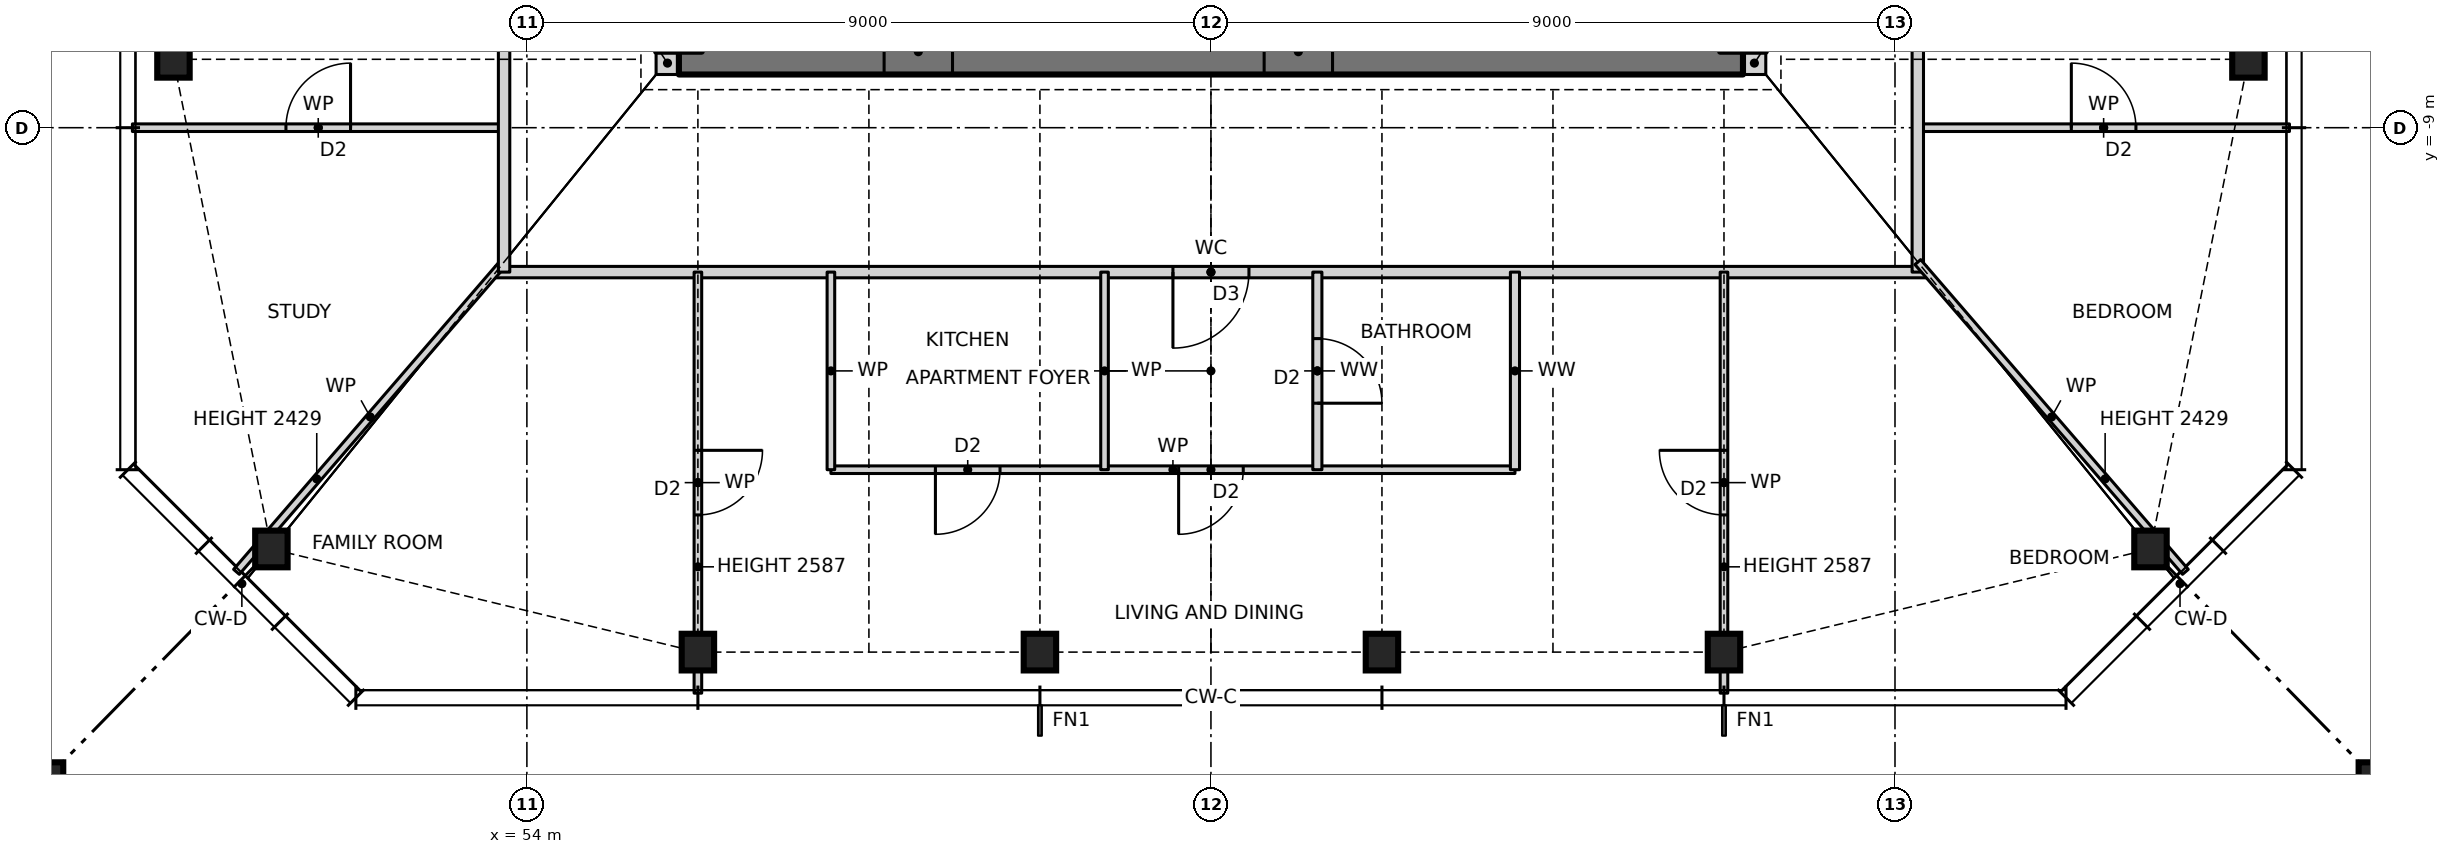
"""IFC4 building model, lengths in metres.
Left out: names, types, materials, properties, quantities, classifications, styles, units other than length and angle.
Written with IfcOpenShell. Run it as: python <this file> out.ifc"""

import sys

from ifc_helpers import new_model, si_unit, direction, frame, frame_2d, origin, origin_2d, place, context, subcontext, project, spatial, rectangle, hollow_rectangle, i_section, extrude, element, fill, save


model = new_model("IFC4")
c1 = context("Model", 3, precision=1e-05, world=origin(), true_north=direction((0.0, 1.0)))
c2 = subcontext(c1, "Body", "Model", "MODEL_VIEW")
j1 = project(units=[si_unit("LENGTHUNIT", "METRE"), si_unit("PLANEANGLEUNIT", "RADIAN")], contexts=[c1])
p1 = place(None, origin())
s1 = spatial("IfcSite", under=j1, at=p1, CompositionType="ELEMENT")
p2 = place(p1, origin())
s2 = spatial("IfcBuilding", under=s1, at=p2, CompositionType="ELEMENT")
p3 = place(p2, frame((0.0, 0.0, 119.0)))
s3 = spatial("IfcBuildingStorey", under=s2, at=p3, CompositionType="ELEMENT", Elevation=119.0)
for number, where, z_axis, x_axis in (
    (1, (50.639, -14.543, 0.0), (0.0, 0.0, 1.0), (1.0, 0.0, 0.0)),
    (2, (56.25, -15.9, 0.0), (0.0, 0.0, 1.0), (1.0, 0.0, 0.0)),
    (3, (60.75, -15.9, 0.0), (0.0, 0.0, 1.0), (1.0, 0.0, 0.0)),
    (4, (65.25, -15.9, 0.0), (0.0, 0.0, 1.0), (1.0, 0.0, 0.0)),
    (5, (69.75, -15.9, 0.0), (0.0, 0.0, 1.0), (1.0, 0.0, 0.0)),
    (6, (75.361, -14.543, 0.0), (0.0, 0.0, 1.0), (1.0, 0.0, 0.0)),
    (7, (76.65, -8.1, 0.0), (0.0, 0.0, 1.0), (1.0, 0.0, 0.0)),
    (8, (49.35, -8.1, 0.0), (0.0, 0.0, 1.0), (1.0, 0.0, 0.0)),
):
    element("IfcColumn", number, at=place(p3, frame(where, z_axis=z_axis, x_axis=x_axis)), inside=s3, PredefinedType="COLUMN", context=c2, shape_type="SweptSolid", body=[
        extrude(i_section(OverallWidth=0.427, OverallDepth=0.483, WebThickness=0.051, FlangeThickness=0.082, at=origin_2d()), origin(), (0.0, 0.0, 1.0), 3.5),
    ])
for number, where, z_axis, x_axis in (
    (9, (47.35, -17.9, 0.0), (0.0, 0.0, 1.0), (1.0, 0.0, 0.0)),
    (10, (78.65, -17.9, 0.0), (0.0, 0.0, 1.0), (1.0, 0.0, 0.0)),
):
    element("IfcColumn", number, at=place(p3, frame(where, z_axis=z_axis, x_axis=x_axis)), inside=s3, PredefinedType="COLUMN", context=c2, shape_type="SweptSolid", body=[
        extrude(hollow_rectangle(XDim=1.1, YDim=1.1, WallThickness=0.06, at=origin_2d()), origin(), (0.0, 0.0, 1.0), 3.5),
    ])
for number, where, z_axis, x_axis in (
    (11, (55.7, -8.15, 0.0), (0.0, 0.0, 1.0), (1.0, 0.0, 0.0)),
    (12, (70.0, -8.15, 0.0), (0.0, 0.0, 1.0), (1.0, 0.0, 0.0)),
):
    element("IfcWall", number, at=place(p3, frame(where, z_axis=z_axis, x_axis=x_axis)), inside=s3, PredefinedType="SOLIDWALL", context=c2, shape_type="SweptSolid", body=[
        extrude(rectangle(XDim=0.3, YDim=0.3, at=frame_2d((0.15, 0.0))), origin(), (0.0, 0.0, 1.0), 3.5),
    ])
p4 = place(p3, frame((56.0, -8.0, 0.0), z_axis=(0.0, 0.0, 1.0), x_axis=(1.0, 0.0, 0.0)))
e13 = element("IfcWall", 13, at=p4, inside=s3, PredefinedType="SHEAR", context=c2, shape_type="SweptSolid", body=[
    extrude(rectangle(XDim=14.0, YDim=0.6, at=frame_2d((7.0, 0.0))), origin(), (0.0, 0.0, 1.0), 3.5),
])
p5 = place(p4, frame((2.7, 0.0, 0.0)))
e14 = element("IfcOpeningElement", 14, at=p5, cuts=e13, PredefinedType="OPENING", context=c2, shape_type="SweptSolid", body=[
    extrude(rectangle(XDim=0.9, YDim=2.1, at=frame_2d((0.45, 1.05))), frame((0.0, 0.31, 0.0), z_axis=(0.0, -1.0, 0.0), x_axis=(1.0, 0.0, 0.0)), (0.0, 0.0, 1.0), 0.62),
])
p6 = place(p4, frame((7.7, 0.0, 0.0)))
e15 = element("IfcOpeningElement", 15, at=p6, cuts=e13, PredefinedType="OPENING", context=c2, shape_type="SweptSolid", body=[
    extrude(rectangle(XDim=0.9, YDim=2.1, at=frame_2d((0.45, 1.05))), frame((0.0, 0.31, 0.0), z_axis=(0.0, -1.0, 0.0), x_axis=(1.0, 0.0, 0.0)), (0.0, 0.0, 1.0), 0.62),
])
p7 = place(p3, frame((58.0, -13.5, 0.0), z_axis=(0.0, 0.0, 1.0), x_axis=(1.0, 0.0, 0.0)))
e16 = element("IfcWall", 16, at=p7, inside=s3, PredefinedType="PARTITIONING", context=c2, shape_type="SweptSolid", body=[
    extrude(rectangle(XDim=9.0, YDim=0.1, at=frame_2d((4.5, 0.0))), origin(), (0.0, 0.0, 1.0), 3.27),
])
p8 = place(p7, frame((1.375, 0.0, 0.0)))
e17 = element("IfcOpeningElement", 17, at=p8, cuts=e16, PredefinedType="OPENING", context=c2, shape_type="SweptSolid", body=[
    extrude(rectangle(XDim=0.85, YDim=2.1, at=frame_2d((0.425, 1.05))), frame((0.0, 0.06, 0.0), z_axis=(0.0, -1.0, 0.0), x_axis=(1.0, 0.0, 0.0)), (0.0, 0.0, 1.0), 0.12),
])
p9 = place(p7, frame((4.575, 0.0, 0.0)))
e18 = element("IfcOpeningElement", 18, at=p9, cuts=e16, PredefinedType="OPENING", context=c2, shape_type="SweptSolid", body=[
    extrude(rectangle(XDim=0.85, YDim=2.1, at=frame_2d((0.425, 1.05))), frame((0.0, 0.06, 0.0), z_axis=(0.0, -1.0, 0.0), x_axis=(1.0, 0.0, 0.0)), (0.0, 0.0, 1.0), 0.12),
])
p10 = place(p3, frame((53.586, -10.9, 0.0), z_axis=(0.0, 0.0, 1.0), x_axis=(1.0, 0.0, 0.0)))
e19 = element("IfcWall", 19, at=p10, inside=s3, PredefinedType="PARTITIONING", context=c2, shape_type="SweptSolid", body=[
    extrude(rectangle(XDim=18.828, YDim=0.15, at=frame_2d((9.414, 0.0))), origin(), (0.0, 0.0, 1.0), 3.27),
])
p11 = place(p10, frame((8.914, 0.0, 0.0)))
e20 = element("IfcOpeningElement", 20, at=p11, cuts=e19, PredefinedType="OPENING", context=c2, shape_type="SweptSolid", body=[
    extrude(rectangle(XDim=1.0, YDim=2.1, at=frame_2d((0.5, 1.05))), frame((0.0, 0.085, 0.0), z_axis=(0.0, -1.0, 0.0), x_axis=(1.0, 0.0, 0.0)), (0.0, 0.0, 1.0), 0.17),
])
p12 = place(p3, frame((48.81, -9.0, 0.0), z_axis=(0.0, 0.0, 1.0), x_axis=(1.0, 0.0, 0.0)))
e21 = element("IfcWall", 21, at=p12, inside=s3, PredefinedType="PARTITIONING", context=c2, shape_type="SweptSolid", body=[
    extrude(rectangle(XDim=4.89, YDim=0.1, at=frame_2d((2.445, 0.0))), origin(), (0.0, 0.0, 1.0), 3.27),
])
p13 = place(p12, frame((2.02, 0.0, 0.0)))
e22 = element("IfcOpeningElement", 22, at=p13, cuts=e21, PredefinedType="OPENING", context=c2, shape_type="SweptSolid", body=[
    extrude(rectangle(XDim=0.85, YDim=2.1, at=frame_2d((0.425, 1.05))), frame((0.0, 0.06, 0.0), z_axis=(0.0, -1.0, 0.0), x_axis=(1.0, 0.0, 0.0)), (0.0, 0.0, 1.0), 0.12),
])
p14 = place(p3, frame((72.3, -9.0, 0.0), z_axis=(0.0, 0.0, 1.0), x_axis=(1.0, 0.0, 0.0)))
e23 = element("IfcWall", 23, at=p14, inside=s3, PredefinedType="PARTITIONING", context=c2, shape_type="SweptSolid", body=[
    extrude(rectangle(XDim=4.89, YDim=0.1, at=frame_2d((2.445, 0.0))), origin(), (0.0, 0.0, 1.0), 3.27),
])
p15 = place(p14, frame((2.02, 0.0, 0.0)))
e24 = element("IfcOpeningElement", 24, at=p15, cuts=e23, PredefinedType="OPENING", context=c2, shape_type="SweptSolid", body=[
    extrude(rectangle(XDim=0.85, YDim=2.1, at=frame_2d((0.425, 1.05))), frame((0.0, 0.06, 0.0), z_axis=(0.0, -1.0, 0.0), x_axis=(1.0, 0.0, 0.0)), (0.0, 0.0, 1.0), 0.12),
])
p16 = place(p3, frame((50.179, -14.844, 0.0), z_axis=(0.0, 0.0, 1.0), x_axis=(0.653713095188, 0.756742485381, 0.0)))
e25 = element("IfcWall", 25, at=p16, inside=s3, PredefinedType="PARTITIONING", context=c2, shape_type="SweptSolid", body=[
    extrude(rectangle(XDim=5.386, YDim=0.1, at=frame_2d((2.693, 0.0))), origin(), (0.0, 0.0, 1.0), 2.429),
])
p17 = place(p3, frame((72.3, -10.9, 0.0), z_axis=(0.0, 0.0, 1.0), x_axis=(0.0, 1.0, 0.0)))
e26 = element("IfcWall", 26, at=p17, inside=s3, PredefinedType="PARTITIONING", context=c2, shape_type="SweptSolid", body=[
    extrude(rectangle(XDim=21.668, YDim=0.15, at=frame_2d((10.834, 0.0))), origin(), (0.0, 0.0, 1.0), 3.27),
])
p18 = place(p17, frame((10.4, 0.0, 0.0)))
e27 = element("IfcOpeningElement", 27, at=p18, cuts=e26, PredefinedType="OPENING", context=c2, shape_type="SweptSolid", body=[
    extrude(rectangle(XDim=1.0, YDim=2.1, at=frame_2d((0.5, 1.05))), frame((0.0, 0.085, 0.0), z_axis=(0.0, -1.0, 0.0), x_axis=(1.0, 0.0, 0.0)), (0.0, 0.0, 1.0), 0.17),
])
p19 = place(p3, frame((69.75, -16.44, 0.0), z_axis=(0.0, 0.0, 1.0), x_axis=(0.0, 1.0, 0.0)))
e28 = element("IfcWall", 28, at=p19, inside=s3, PredefinedType="PARTITIONING", context=c2, shape_type="SweptSolid", body=[
    extrude(rectangle(XDim=5.54, YDim=0.1, at=frame_2d((2.77, 0.0))), origin(), (0.0, 0.0, 1.0), 2.587),
])
p20 = place(p19, frame((2.345, 0.0, 0.0)))
e29 = element("IfcOpeningElement", 29, at=p20, cuts=e28, PredefinedType="OPENING", context=c2, shape_type="SweptSolid", body=[
    extrude(rectangle(XDim=0.85, YDim=2.1, at=frame_2d((0.425, 1.05))), frame((0.0, 0.06, 0.0), z_axis=(0.0, -1.0, 0.0), x_axis=(1.0, 0.0, 0.0)), (0.0, 0.0, 1.0), 0.12),
])
p21 = place(p3, frame((67.0, -13.5, 0.0), z_axis=(0.0, 0.0, 1.0), x_axis=(0.0, 1.0, 0.0)))
e30 = element("IfcWall", 30, at=p21, inside=s3, PredefinedType="PARTITIONING", context=c2, shape_type="SweptSolid", body=[
    extrude(rectangle(XDim=2.6, YDim=0.12, at=frame_2d((1.3, 0.0))), origin(), (0.0, 0.0, 1.0), 3.27),
])
p22 = place(p3, frame((64.4, -13.5, 0.0), z_axis=(0.0, 0.0, 1.0), x_axis=(0.0, 1.0, 0.0)))
e31 = element("IfcWall", 31, at=p22, inside=s3, PredefinedType="PARTITIONING", context=c2, shape_type="SweptSolid", body=[
    extrude(rectangle(XDim=2.6, YDim=0.12, at=frame_2d((1.3, 0.0))), origin(), (0.0, 0.0, 1.0), 3.27),
])
p23 = place(p22, frame((0.875, 0.0, 0.0)))
e32 = element("IfcOpeningElement", 32, at=p23, cuts=e31, PredefinedType="OPENING", context=c2, shape_type="SweptSolid", body=[
    extrude(rectangle(XDim=0.85, YDim=2.1, at=frame_2d((0.425, 1.05))), frame((0.0, 0.07, 0.0), z_axis=(0.0, -1.0, 0.0), x_axis=(1.0, 0.0, 0.0)), (0.0, 0.0, 1.0), 0.14),
])
for number, where, z_axis, x_axis in (
    (33, (61.6, -13.5, 0.0), (0.0, 0.0, 1.0), (0.0, 1.0, 0.0)),
    (34, (58.0, -13.5, 0.0), (0.0, 0.0, 1.0), (0.0, 1.0, 0.0)),
):
    element("IfcWall", number, at=place(p3, frame(where, z_axis=z_axis, x_axis=x_axis)), inside=s3, PredefinedType="PARTITIONING", context=c2, shape_type="SweptSolid", body=[
        extrude(rectangle(XDim=2.6, YDim=0.1, at=frame_2d((1.3, 0.0))), origin(), (0.0, 0.0, 1.0), 3.27),
    ])
p24 = place(p3, frame((56.25, -16.44, 0.0), z_axis=(0.0, 0.0, 1.0), x_axis=(0.0, 1.0, 0.0)))
e35 = element("IfcWall", 35, at=p24, inside=s3, PredefinedType="PARTITIONING", context=c2, shape_type="SweptSolid", body=[
    extrude(rectangle(XDim=5.54, YDim=0.1, at=frame_2d((2.77, 0.0))), origin(), (0.0, 0.0, 1.0), 2.587),
])
p25 = place(p24, frame((2.345, 0.0, 0.0)))
e36 = element("IfcOpeningElement", 36, at=p25, cuts=e35, PredefinedType="OPENING", context=c2, shape_type="SweptSolid", body=[
    extrude(rectangle(XDim=0.85, YDim=2.1, at=frame_2d((0.425, 1.05))), frame((0.0, 0.06, 0.0), z_axis=(0.0, -1.0, 0.0), x_axis=(1.0, 0.0, 0.0)), (0.0, 0.0, 1.0), 0.12),
])
p26 = place(p3, frame((53.7, -10.9, 0.0), z_axis=(0.0, 0.0, 1.0), x_axis=(0.0, 1.0, 0.0)))
e37 = element("IfcWall", 37, at=p26, inside=s3, PredefinedType="PARTITIONING", context=c2, shape_type="SweptSolid", body=[
    extrude(rectangle(XDim=21.668, YDim=0.15, at=frame_2d((10.834, 0.0))), origin(), (0.0, 0.0, 1.0), 3.27),
])
p27 = place(p26, frame((10.4, 0.0, 0.0)))
e38 = element("IfcOpeningElement", 38, at=p27, cuts=e37, PredefinedType="OPENING", context=c2, shape_type="SweptSolid", body=[
    extrude(rectangle(XDim=1.0, YDim=2.1, at=frame_2d((0.5, 1.05))), frame((0.0, 0.085, 0.0), z_axis=(0.0, -1.0, 0.0), x_axis=(1.0, 0.0, 0.0)), (0.0, 0.0, 1.0), 0.17),
])
p28 = place(p3, frame((75.821, -14.844, 0.0), z_axis=(0.0, 0.0, 1.0), x_axis=(-0.653713095188, 0.756742485381, 0.0)))
e39 = element("IfcWall", 39, at=p28, inside=s3, PredefinedType="PARTITIONING", context=c2, shape_type="SweptSolid", body=[
    extrude(rectangle(XDim=5.386, YDim=0.1, at=frame_2d((2.693, 0.0))), origin(), (0.0, 0.0, 1.0), 2.429),
])
p29 = place(p8, frame((0.85, 0.0, 0.0), z_axis=(0.0, 0.0, 1.0), x_axis=(-1.0, 0.0, 0.0)))
e40 = element("IfcDoor", 40, at=p29, inside=s3, OperationType="SINGLE_SWING_RIGHT", PredefinedType="DOOR", context=c2, shape_type="SweptSolid", body=[
    extrude(rectangle(XDim=0.85, YDim=2.1, at=frame_2d((0.425, 1.05))), frame((0.0, 0.025, 0.0), z_axis=(0.0, -1.0, 0.0), x_axis=(1.0, 0.0, 0.0)), (0.0, 0.0, 1.0), 0.05),
])
fill(e17, e40)
p30 = place(p11, frame((1.0, 0.0, 0.0), z_axis=(0.0, 0.0, 1.0), x_axis=(-1.0, 0.0, 0.0)))
e41 = element("IfcDoor", 41, at=p30, inside=s3, OperationType="SINGLE_SWING_RIGHT", PredefinedType="DOOR", context=c2, shape_type="SweptSolid", body=[
    extrude(rectangle(XDim=1.0, YDim=2.1, at=frame_2d((0.5, 1.05))), frame((0.0, 0.025, 0.0), z_axis=(0.0, -1.0, 0.0), x_axis=(1.0, 0.0, 0.0)), (0.0, 0.0, 1.0), 0.05),
])
fill(e20, e41)
p31 = place(p9, frame((0.85, 0.0, 0.0), z_axis=(0.0, 0.0, 1.0), x_axis=(-1.0, 0.0, 0.0)))
e42 = element("IfcDoor", 42, at=p31, inside=s3, OperationType="SINGLE_SWING_RIGHT", PredefinedType="DOOR", context=c2, shape_type="SweptSolid", body=[
    extrude(rectangle(XDim=0.85, YDim=2.1, at=frame_2d((0.425, 1.05))), frame((0.0, 0.025, 0.0), z_axis=(0.0, -1.0, 0.0), x_axis=(1.0, 0.0, 0.0)), (0.0, 0.0, 1.0), 0.05),
])
fill(e18, e42)
p32 = place(p23, frame((0.85, 0.0, 0.0), z_axis=(0.0, 0.0, 1.0), x_axis=(-1.0, 0.0, 0.0)))
e43 = element("IfcDoor", 43, at=p32, inside=s3, OperationType="SINGLE_SWING_RIGHT", PredefinedType="DOOR", context=c2, shape_type="SweptSolid", body=[
    extrude(rectangle(XDim=0.85, YDim=2.1, at=frame_2d((0.425, 1.05))), frame((0.0, 0.025, 0.0), z_axis=(0.0, -1.0, 0.0), x_axis=(1.0, 0.0, 0.0)), (0.0, 0.0, 1.0), 0.05),
])
fill(e32, e43)
p33 = place(p25, frame((0.85, 0.0, 0.0), z_axis=(0.0, 0.0, 1.0), x_axis=(-1.0, 0.0, 0.0)))
e44 = element("IfcDoor", 44, at=p33, inside=s3, OperationType="SINGLE_SWING_LEFT", PredefinedType="DOOR", context=c2, shape_type="SweptSolid", body=[
    extrude(rectangle(XDim=0.85, YDim=2.1, at=frame_2d((0.425, 1.05))), frame((0.0, 0.025, 0.0), z_axis=(0.0, -1.0, 0.0), x_axis=(1.0, 0.0, 0.0)), (0.0, 0.0, 1.0), 0.05),
])
fill(e36, e44)
p34 = place(p20, origin())
e45 = element("IfcDoor", 45, at=p34, inside=s3, OperationType="SINGLE_SWING_RIGHT", PredefinedType="DOOR", context=c2, shape_type="SweptSolid", body=[
    extrude(rectangle(XDim=0.85, YDim=2.1, at=frame_2d((0.425, 1.05))), frame((0.0, 0.025, 0.0), z_axis=(0.0, -1.0, 0.0), x_axis=(1.0, 0.0, 0.0)), (0.0, 0.0, 1.0), 0.05),
])
fill(e29, e45)
p35 = place(p15, origin())
e46 = element("IfcDoor", 46, at=p35, inside=s3, OperationType="SINGLE_SWING_LEFT", PredefinedType="DOOR", context=c2, shape_type="SweptSolid", body=[
    extrude(rectangle(XDim=0.85, YDim=2.1, at=frame_2d((0.425, 1.05))), frame((0.0, 0.025, 0.0), z_axis=(0.0, -1.0, 0.0), x_axis=(1.0, 0.0, 0.0)), (0.0, 0.0, 1.0), 0.05),
])
fill(e24, e46)
p36 = place(p13, origin())
e47 = element("IfcDoor", 47, at=p36, inside=s3, OperationType="SINGLE_SWING_RIGHT", PredefinedType="DOOR", context=c2, shape_type="SweptSolid", body=[
    extrude(rectangle(XDim=0.85, YDim=2.1, at=frame_2d((0.425, 1.05))), frame((0.0, 0.025, 0.0), z_axis=(0.0, -1.0, 0.0), x_axis=(1.0, 0.0, 0.0)), (0.0, 0.0, 1.0), 0.05),
])
fill(e22, e47)
p37 = place(p5, origin())
e48 = element("IfcDoor", 48, at=p37, inside=s3, OperationType="SINGLE_SWING_RIGHT", PredefinedType="DOOR", context=c2, shape_type="SweptSolid", body=[
    extrude(rectangle(XDim=0.9, YDim=2.1, at=frame_2d((0.45, 1.05))), frame((0.0, 0.025, 0.0), z_axis=(0.0, -1.0, 0.0), x_axis=(1.0, 0.0, 0.0)), (0.0, 0.0, 1.0), 0.05),
])
fill(e14, e48)
p38 = place(p6, origin())
e49 = element("IfcDoor", 49, at=p38, inside=s3, OperationType="SINGLE_SWING_LEFT", PredefinedType="DOOR", context=c2, shape_type="SweptSolid", body=[
    extrude(rectangle(XDim=0.9, YDim=2.1, at=frame_2d((0.45, 1.05))), frame((0.0, 0.025, 0.0), z_axis=(0.0, -1.0, 0.0), x_axis=(1.0, 0.0, 0.0)), (0.0, 0.0, 1.0), 0.05),
])
fill(e15, e49)
save(model, sys.argv[1])
